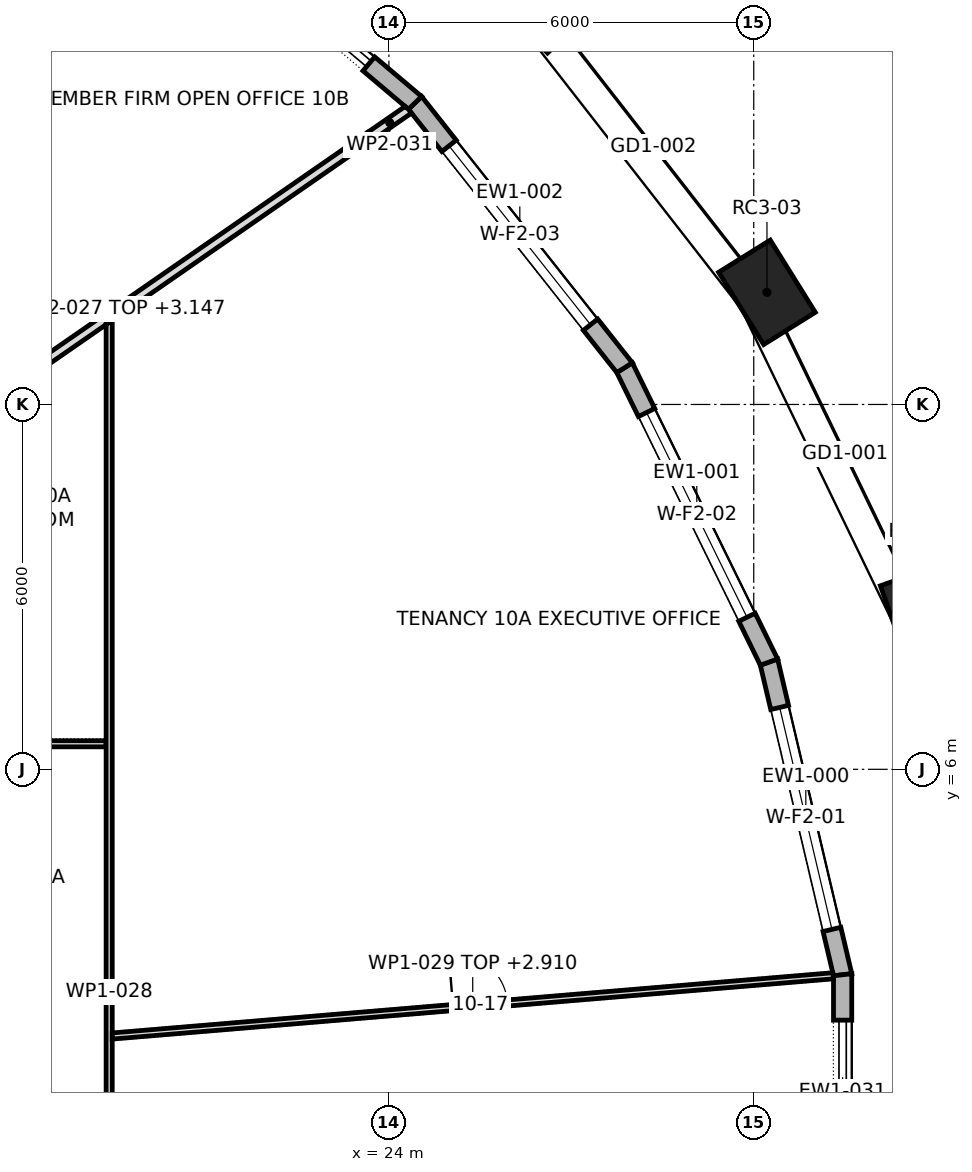
"""IFC4 building model, lengths in metres.
Left out: names, types, materials, properties, quantities, classifications, styles, units other than length and angle.
Written with IfcOpenShell. Run it as: python <this file> out.ifc"""

import sys

from ifc_helpers import new_model, si_unit, direction, frame, frame_2d, origin, origin_2d, place, context, subcontext, project, spatial, polyline, rectangle, outline, extrude, element, fill, save


model = new_model("IFC4")
c1 = context("Model", 3, precision=1e-05, world=origin(), true_north=direction((0.0, 1.0)))
c2 = subcontext(c1, "Body", "Model", "MODEL_VIEW")
j1 = project(units=[si_unit("LENGTHUNIT", "METRE"), si_unit("PLANEANGLEUNIT", "RADIAN")], contexts=[c1])
p1 = place(None, origin())
s1 = spatial("IfcSite", under=j1, at=p1, CompositionType="ELEMENT")
p2 = place(p1, origin())
s2 = spatial("IfcBuilding", under=s1, at=p2, CompositionType="ELEMENT")
p3 = place(p2, frame((0.0, 0.0, 142.3)))
s3 = spatial("IfcBuildingStorey", under=s2, at=p3, CompositionType="ELEMENT", Elevation=142.3)
for number, where, z_axis, x_axis in (
    (1, (32.788, 8.525, 0.0), (0.0, 0.0, 1.0), (-0.334, 0.943, 0.0)),
    (2, (30.217, 13.844, 0.0), (0.0, 0.0, 1.0), (-0.529, 0.849, 0.0)),
    (3, (26.486, 18.631, 0.0), (0.0, 0.0, 1.0), (-0.692, 0.722, 0.0)),
):
    element("IfcColumn", number, at=place(p3, frame(where, z_axis=z_axis, x_axis=x_axis)), inside=s3, PredefinedType="COLUMN", context=c2, shape_type="SweptSolid", body=[
        extrude(rectangle(XDim=1.4, YDim=1.0, at=origin_2d()), origin(), (0.0, 0.0, 1.0), 4.2),
    ])
p4 = place(p3, frame((31.462, 2.622, 0.0), z_axis=(0.0, 0.0, 1.0), x_axis=(-0.229289208312, 0.973358340464, 0.0)))
e4 = element("IfcWall", 4, at=p4, inside=s3, PredefinedType="STANDARD", context=c2, shape_type="SweptSolid", body=[
    extrude(outline(polyline([(-0.017, -0.15), (5.299, -0.15), (5.265, 0.15), (0.017, 0.15), (-0.017, -0.15)])), origin(), (0.0, 0.0, 1.0), 3.9),
])
p5 = place(p4, frame((0.766, 0.0, 0.6)))
e5 = element("IfcOpeningElement", 5, at=p5, cuts=e4, PredefinedType="OPENING", context=c2, shape_type="SweptSolid", body=[
    extrude(rectangle(XDim=3.75, YDim=2.85, at=frame_2d((1.875, 1.425))), frame((0.0, 0.162, 0.0), z_axis=(0.0, -1.0, 0.0), x_axis=(1.0, 0.0, 0.0)), (0.0, 0.0, 1.0), 0.324),
])
p6 = place(p3, frame((30.25, 7.763, 0.0), z_axis=(0.0, 0.0, 1.0), x_axis=(-0.440373354088, 0.897814740918, 0.0)))
e6 = element("IfcWall", 6, at=p6, inside=s3, PredefinedType="STANDARD", context=c2, shape_type="SweptSolid", body=[
    extrude(outline(polyline([(-0.017, -0.15), (5.409, -0.15), (5.376, 0.15), (0.017, 0.15), (-0.017, -0.15)])), origin(), (0.0, 0.0, 1.0), 3.9),
])
p7 = place(p6, frame((0.821, 0.0, 0.6)))
e7 = element("IfcOpeningElement", 7, at=p7, cuts=e6, PredefinedType="OPENING", context=c2, shape_type="SweptSolid", body=[
    extrude(rectangle(XDim=3.75, YDim=2.85, at=frame_2d((1.875, 1.425))), frame((0.0, 0.162, 0.0), z_axis=(0.0, -1.0, 0.0), x_axis=(1.0, 0.0, 0.0)), (0.0, 0.0, 1.0), 0.324),
])
p8 = place(p3, frame((27.876, 12.605, 0.0), z_axis=(0.0, 0.0, 1.0), x_axis=(-0.620520511988, 0.784190215574, 0.0)))
e8 = element("IfcWall", 8, at=p8, inside=s3, PredefinedType="STANDARD", context=c2, shape_type="SweptSolid", body=[
    extrude(outline(polyline([(-0.016, -0.15), (5.569, -0.15), (5.538, 0.15), (0.016, 0.15), (-0.016, -0.15)])), origin(), (0.0, 0.0, 1.0), 3.9),
])
p9 = place(p8, frame((0.902, 0.0, 0.6)))
e9 = element("IfcOpeningElement", 9, at=p9, cuts=e8, PredefinedType="OPENING", context=c2, shape_type="SweptSolid", body=[
    extrude(rectangle(XDim=3.75, YDim=2.85, at=frame_2d((1.875, 1.425))), frame((0.0, 0.162, 0.0), z_axis=(0.0, -1.0, 0.0), x_axis=(1.0, 0.0, 0.0)), (0.0, 0.0, 1.0), 0.324),
])
p10 = place(p3, frame((24.43, 16.96, 0.0), z_axis=(0.0, 0.0, 1.0), x_axis=(-0.764047627809, 0.64515984255, 0.0)))
e10 = element("IfcWall", 10, at=p10, inside=s3, PredefinedType="STANDARD", context=c2, shape_type="SweptSolid", body=[
    extrude(outline(polyline([(-0.015, -0.15), (5.752, -0.15), (5.723, 0.15), (0.015, 0.15), (-0.015, -0.15)])), origin(), (0.0, 0.0, 1.0), 3.9),
])
p11 = place(p10, frame((0.994, 0.0, 0.0)))
e11 = element("IfcOpeningElement", 11, at=p11, cuts=e10, PredefinedType="OPENING", context=c2, shape_type="SweptSolid", body=[
    extrude(rectangle(XDim=3.75, YDim=3.45, at=frame_2d((1.875, 1.725))), frame((0.0, 0.162, 0.0), z_axis=(0.0, -1.0, 0.0), x_axis=(1.0, 0.0, 0.0)), (0.0, 0.0, 1.0), 0.324),
])
p12 = place(p3, frame((31.462, -2.622, 0.0), z_axis=(0.0, 0.0, 1.0), x_axis=(0.0, 1.0, 0.0)))
e12 = element("IfcWall", 12, at=p12, inside=s3, PredefinedType="STANDARD", context=c2, shape_type="SweptSolid", body=[
    extrude(outline(polyline([(-0.017, -0.15), (5.26, -0.15), (5.226, 0.15), (0.017, 0.15), (-0.017, -0.15)])), origin(), (0.0, 0.0, 1.0), 3.9),
])
p13 = place(p12, frame((0.747, 0.0, 0.0)))
e13 = element("IfcOpeningElement", 13, at=p13, cuts=e12, PredefinedType="OPENING", context=c2, shape_type="SweptSolid", body=[
    extrude(rectangle(XDim=3.75, YDim=3.45, at=frame_2d((1.875, 1.725))), frame((0.0, 0.162, 0.0), z_axis=(0.0, -1.0, 0.0), x_axis=(1.0, 0.0, 0.0)), (0.0, 0.0, 1.0), 0.324),
])
p14 = place(p3, frame((15.475, 6.42, 0.0), z_axis=(0.0, 0.0, 1.0), x_axis=(1.0, 0.0, 0.0)))
e14 = element("IfcWall", 14, at=p14, inside=s3, PredefinedType="PARTITIONING", context=c2, shape_type="SweptSolid", body=[
    extrude(rectangle(XDim=3.875, YDim=0.1, at=frame_2d((1.938, 0.0))), origin(), (0.0, 0.0, 1.0), 3.9),
])
p15 = place(p3, frame((15.433, 10.692, 0.0), z_axis=(0.0, 0.0, 1.0), x_axis=(0.822113566053, 0.569323532372, 0.0)))
e15 = element("IfcWall", 15, at=p15, inside=s3, PredefinedType="PARTITIONING", context=c2, shape_type="SweptSolid", body=[
    extrude(outline(polyline([(0.0, -0.075), (1.571, -0.075), (3.142, -0.075), (4.713, -0.075), (4.715, -0.072), (4.719, -0.075), (6.5, -0.075), (8.281, -0.075), (10.062, -0.075), (10.062, 0.075), (8.07, 0.075), (6.078, 0.075), (4.087, 0.075), (2.095, 0.075), (0.104, 0.075), (0.0, -0.074), (0.0, -0.075)])), origin(), (0.0, 0.0, 1.0), 3.147),
])
p16 = place(p3, frame((19.4, -8.697, 0.0), z_axis=(0.0, 0.0, 1.0), x_axis=(0.0, 1.0, 0.0)))
e16 = element("IfcWall", 16, at=p16, inside=s3, PredefinedType="PARTITIONING", context=c2, shape_type="SweptSolid", body=[
    extrude(outline(polyline([(22.08, -0.05), (22.08, -0.05), (22.01, 0.05), (20.3, 0.05), (18.589, 0.05), (16.877, 0.05), (15.167, 0.05), (15.167, 0.05), (15.067, 0.05), (15.067, 0.05), (13.262, 0.05), (11.458, 0.05), (9.655, 0.05), (7.851, 0.05), (6.047, 0.05), (6.047, 0.05), (5.947, 0.05), (5.947, 0.05), (3.979, 0.05), (2.012, 0.05), (0.045, 0.05), (0.0, -0.049), (0.0, -0.05), (1.84, -0.05), (3.68, -0.05), (5.52, -0.05), (7.36, -0.05), (9.2, -0.05), (11.04, -0.05), (12.88, -0.05), (14.72, -0.05), (16.56, -0.05), (18.4, -0.05), (20.24, -0.05), (22.08, -0.05)])), origin(), (0.0, 0.0, 1.0), 3.9),
])
p17 = place(p16, frame((7.701, 0.0, 0.0)))
e17 = element("IfcOpeningElement", 17, at=p17, cuts=e16, PredefinedType="OPENING", context=c2, shape_type="SweptSolid", body=[
    extrude(rectangle(XDim=0.9, YDim=2.1, at=frame_2d((0.45, 1.05))), frame((0.0, 0.062, 0.0), z_axis=(0.0, -1.0, 0.0), x_axis=(1.0, 0.0, 0.0)), (0.0, 0.0, 1.0), 0.124),
])
p18 = place(p3, frame((19.446, 1.614, 0.0), z_axis=(0.0, 0.0, 1.0), x_axis=(0.996528479526, 0.083252564492, 0.0)))
e18 = element("IfcWall", 18, at=p18, inside=s3, PredefinedType="PARTITIONING", context=c2, shape_type="SweptSolid", body=[
    extrude(outline(polyline([(0.0, -0.05), (1.984, -0.05), (3.968, -0.05), (5.952, -0.05), (7.935, -0.05), (9.919, -0.05), (11.903, -0.05), (11.903, -0.05), (11.903, 0.027), (11.9, 0.05), (9.918, 0.05), (7.936, 0.05), (5.954, 0.05), (3.972, 0.05), (1.99, 0.05), (0.008, 0.05), (0.0, -0.05)])), origin(), (0.0, 0.0, 1.0), 2.91),
])
p19 = place(p18, frame((5.63, 0.0, 0.0)))
e19 = element("IfcOpeningElement", 19, at=p19, cuts=e18, PredefinedType="OPENING", context=c2, shape_type="SweptSolid", body=[
    extrude(rectangle(XDim=0.9, YDim=2.1, at=frame_2d((0.45, 1.05))), frame((0.0, 0.062, 0.0), z_axis=(0.0, -1.0, 0.0), x_axis=(1.0, 0.0, 0.0)), (0.0, 0.0, 1.0), 0.124),
])
p20 = place(p3, frame((23.704, 16.421, 0.0), z_axis=(0.0, 0.0, 1.0), x_axis=(0.822076434515, 0.569377147253, 0.0)))
e20 = element("IfcWall", 20, at=p20, inside=s3, PredefinedType="PARTITIONING", context=c2, shape_type="SweptSolid", body=[
    extrude(outline(polyline([(0.759, -0.075), (0.759, -0.069), (0.754, 0.006), (0.736, 0.075), (0.0, 0.075), (0.0, -0.075), (0.759, -0.075)])), origin(), (0.0, 0.0, 1.0), 3.9),
])
p21 = place(p5, origin())
e21 = element("IfcWindow", 21, at=p21, inside=s3, PartitioningType="TRIPLE_PANEL_VERTICAL", PredefinedType="WINDOW", context=c2, shape_type="SweptSolid", body=[
    extrude(rectangle(XDim=3.75, YDim=2.85, at=frame_2d((1.875, 1.425))), frame((0.0, 0.03, 0.0), z_axis=(0.0, -1.0, 0.0), x_axis=(1.0, 0.0, 0.0)), (0.0, 0.0, 1.0), 0.06),
])
fill(e5, e21)
p22 = place(p7, origin())
e22 = element("IfcWindow", 22, at=p22, inside=s3, PartitioningType="TRIPLE_PANEL_VERTICAL", PredefinedType="WINDOW", context=c2, shape_type="SweptSolid", body=[
    extrude(rectangle(XDim=3.75, YDim=2.85, at=frame_2d((1.875, 1.425))), frame((0.0, 0.03, 0.0), z_axis=(0.0, -1.0, 0.0), x_axis=(1.0, 0.0, 0.0)), (0.0, 0.0, 1.0), 0.06),
])
fill(e7, e22)
p23 = place(p9, origin())
e23 = element("IfcWindow", 23, at=p23, inside=s3, PartitioningType="TRIPLE_PANEL_VERTICAL", PredefinedType="WINDOW", context=c2, shape_type="SweptSolid", body=[
    extrude(rectangle(XDim=3.75, YDim=2.85, at=frame_2d((1.875, 1.425))), frame((0.0, 0.03, 0.0), z_axis=(0.0, -1.0, 0.0), x_axis=(1.0, 0.0, 0.0)), (0.0, 0.0, 1.0), 0.06),
])
fill(e9, e23)
p24 = place(p11, origin())
e24 = element("IfcDoor", 24, at=p24, inside=s3, OperationType="DOUBLE_DOOR_SLIDING", PredefinedType="DOOR", context=c2, shape_type="SweptSolid", body=[
    extrude(rectangle(XDim=3.75, YDim=3.45, at=frame_2d((1.875, 1.725))), frame((0.0, 0.025, 0.0), z_axis=(0.0, -1.0, 0.0), x_axis=(1.0, 0.0, 0.0)), (0.0, 0.0, 1.0), 0.05),
])
fill(e11, e24)
p25 = place(p13, origin())
e25 = element("IfcDoor", 25, at=p25, inside=s3, OperationType="DOUBLE_DOOR_SLIDING", PredefinedType="DOOR", context=c2, shape_type="SweptSolid", body=[
    extrude(rectangle(XDim=3.75, YDim=3.45, at=frame_2d((1.875, 1.725))), frame((0.0, 0.025, 0.0), z_axis=(0.0, -1.0, 0.0), x_axis=(1.0, 0.0, 0.0)), (0.0, 0.0, 1.0), 0.05),
])
fill(e13, e25)
p26 = place(p19, origin())
e26 = element("IfcDoor", 26, at=p26, inside=s3, OperationType="SINGLE_SWING_RIGHT", PredefinedType="DOOR", context=c2, shape_type="SweptSolid", body=[
    extrude(rectangle(XDim=0.9, YDim=2.1, at=frame_2d((0.45, 1.05))), frame((0.0, 0.025, 0.0), z_axis=(0.0, -1.0, 0.0), x_axis=(1.0, 0.0, 0.0)), (0.0, 0.0, 1.0), 0.05),
])
fill(e19, e26)
save(model, sys.argv[1])
